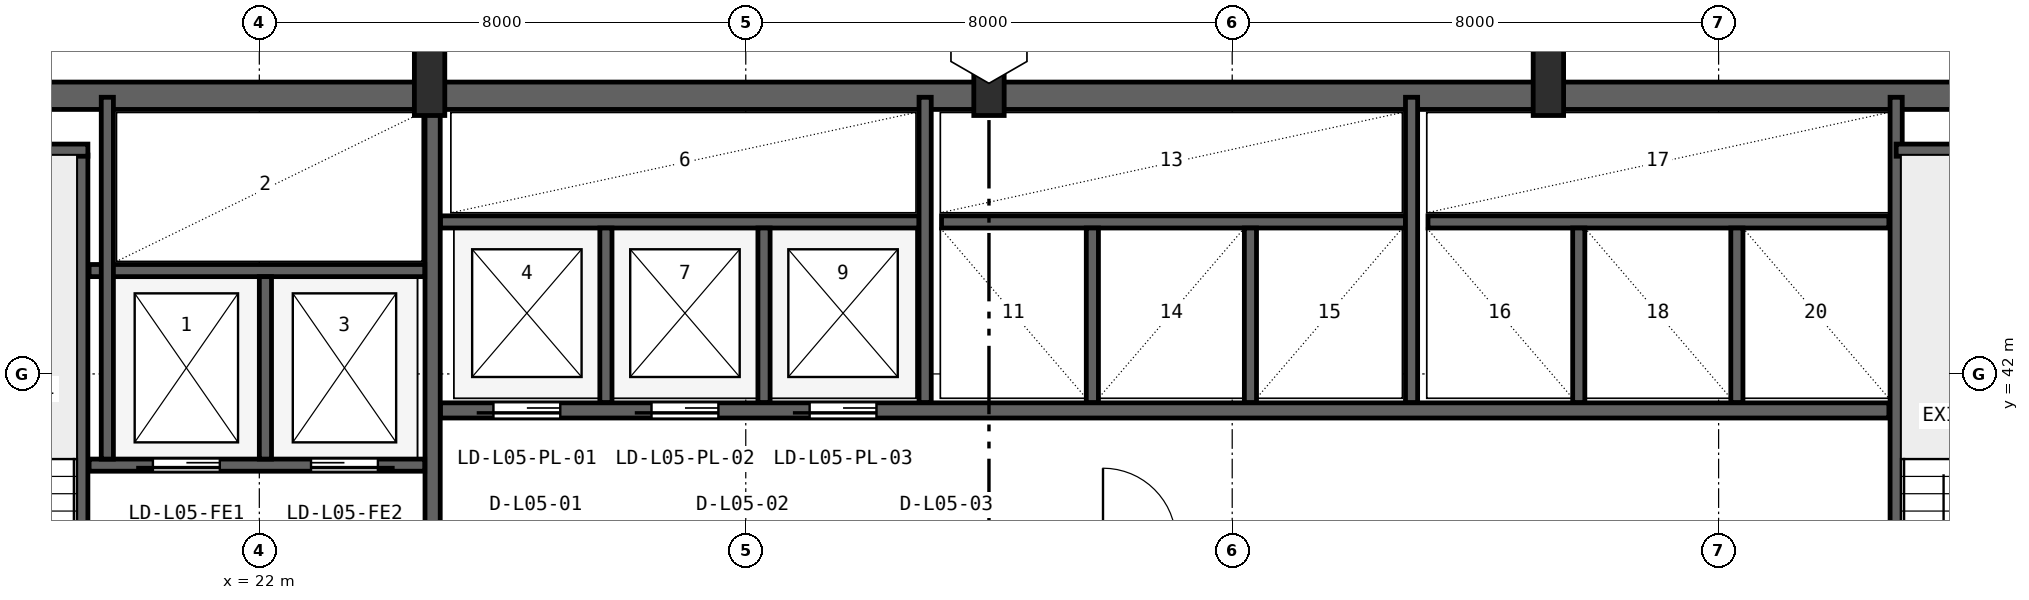
"""IFC4 building model, lengths in metres.
Left out: names, types, materials, properties, quantities, classifications, styles, units other than length and angle.
Written with IfcOpenShell. Run it as: python <this file> out.ifc"""

import sys

from ifc_helpers import new_model, si_unit, direction, frame, frame_2d, origin, origin_2d, place, context, subcontext, project, spatial, rectangle, i_section, extrude, source, transform, mapped, element, fill, save


model = new_model("IFC4")
c1 = context("Model", 3, precision=1e-05, world=origin(), true_north=direction((0.0, 1.0)))
c2 = subcontext(c1, "Body", "Model", "MODEL_VIEW")
j1 = project(units=[si_unit("LENGTHUNIT", "METRE"), si_unit("PLANEANGLEUNIT", "RADIAN")], contexts=[c1])
p1 = place(None, origin())
s1 = spatial("IfcSite", under=j1, at=p1, CompositionType="ELEMENT")
p2 = place(p1, origin())
s2 = spatial("IfcBuilding", under=s1, at=p2, CompositionType="ELEMENT")
p3 = place(p2, frame((0.0, 0.0, 27.6)))
s3 = spatial("IfcBuildingStorey", under=s2, at=p3, CompositionType="ELEMENT", Elevation=27.6)
p4 = place(p3, frame((15.6, 46.575, 0.0), z_axis=(0.0, 0.0, 1.0), x_axis=(1.0, 0.0, 0.0)))
e1 = element("IfcWall", 1, at=p4, inside=s3, PredefinedType="SHEAR", context=c2, shape_type="SweptSolid", body=[
    extrude(rectangle(XDim=36.8, YDim=0.45, at=frame_2d((18.4, 0.0))), origin(), (0.0, 0.0, 1.0), 3.65),
])
m1 = source(origin(), c2, "Body", "SweptSolid", [
    extrude(i_section(OverallWidth=0.5, OverallDepth=1.1, WebThickness=0.018, FlangeThickness=0.032, FilletRadius=0.018, at=origin_2d()), origin(), (0.0, 0.0, 1.0), 3.9),
])
for number, where, z_axis, x_axis in (
    (2, (24.8, 46.8, 0.0), (0.0, 0.0, 1.0), (1.0, 0.0, 0.0)),
    (3, (34.0, 46.8, 0.0), (0.0, 0.0, 1.0), (1.0, 0.0, 0.0)),
    (4, (43.2, 46.8, 0.0), (0.0, 0.0, 1.0), (1.0, 0.0, 0.0)),
):
    element("IfcColumn", number, at=place(p3, frame(where, z_axis=z_axis, x_axis=x_axis)), inside=s3, PredefinedType="COLUMN", context=c2, shape_type="MappedRepresentation", body=[
        mapped(m1, transform((0.0, 0.0, 0.0), x_axis=(1.0, 0.0, 0.0), y_axis=(0.0, 1.0, 0.0), z_axis=(0.0, 0.0, 1.0), scale=1.0)),
    ])
p5 = place(p3, frame((19.08, 35.95, 0.0), z_axis=(0.0, 0.0, 1.0), x_axis=(0.0, 1.0, 0.0)))
e5 = element("IfcWall", 5, at=p5, inside=s3, PredefinedType="SHEAR", context=c2, shape_type="SweptSolid", body=[
    extrude(rectangle(XDim=9.65, YDim=0.2, at=frame_2d((4.825, 0.0))), origin(), (0.0, 0.0, 1.0), 3.65),
])
p6 = place(p5, frame((0.25, 0.0, 0.0)))
e6 = element("IfcOpeningElement", 6, at=p6, cuts=e5, PredefinedType="OPENING", context=c2, shape_type="SweptSolid", body=[
    extrude(rectangle(XDim=0.95, YDim=2.1, at=frame_2d((0.475, 1.05))), frame((0.0, 0.11, 0.0), z_axis=(0.0, -1.0, 0.0), x_axis=(1.0, 0.0, 0.0)), (0.0, 0.0, 1.0), 0.22),
])
p7 = place(p3, frame((15.95, 45.68, 0.0), z_axis=(0.0, 0.0, 1.0), x_axis=(1.0, 0.0, 0.0)))
e7 = element("IfcWall", 7, at=p7, inside=s3, PredefinedType="SHEAR", context=c2, shape_type="SweptSolid", body=[
    extrude(rectangle(XDim=3.23, YDim=0.2, at=frame_2d((1.615, 0.0))), origin(), (0.0, 0.0, 1.0), 3.65),
])
p8 = place(p3, frame((24.85, 36.05, 0.0), z_axis=(0.0, 0.0, 1.0), x_axis=(0.0, 1.0, 0.0)))
e8 = element("IfcWall", 8, at=p8, inside=s3, PredefinedType="SHEAR", context=c2, shape_type="SweptSolid", body=[
    extrude(rectangle(XDim=10.45, YDim=0.25, at=frame_2d((5.225, 0.0))), origin(), (0.0, 0.0, 1.0), 3.65),
])
p9 = place(p3, frame((19.2, 40.5, 0.0), z_axis=(0.0, 0.0, 1.0), x_axis=(1.0, 0.0, 0.0)))
e9 = element("IfcWall", 9, at=p9, inside=s3, PredefinedType="SHEAR", context=c2, shape_type="SweptSolid", body=[
    extrude(rectangle(XDim=5.52, YDim=0.2, at=frame_2d((2.76, 0.0))), origin(), (0.0, 0.0, 1.0), 3.65),
])
p10 = place(p9, frame((1.05, 0.0, 0.0)))
e10 = element("IfcOpeningElement", 10, at=p10, cuts=e9, PredefinedType="OPENING", context=c2, shape_type="SweptSolid", body=[
    extrude(rectangle(XDim=1.1, YDim=2.18, at=frame_2d((0.55, 1.09))), frame((0.0, 0.11, 0.0), z_axis=(0.0, -1.0, 0.0), x_axis=(1.0, 0.0, 0.0)), (0.0, 0.0, 1.0), 0.22),
])
p11 = place(p9, frame((3.65, 0.0, 0.0)))
e11 = element("IfcOpeningElement", 11, at=p11, cuts=e9, PredefinedType="OPENING", context=c2, shape_type="SweptSolid", body=[
    extrude(rectangle(XDim=1.1, YDim=2.18, at=frame_2d((0.55, 1.09))), frame((0.0, 0.11, 0.0), z_axis=(0.0, -1.0, 0.0), x_axis=(1.0, 0.0, 0.0)), (0.0, 0.0, 1.0), 0.22),
])
p12 = place(p3, frame((19.2, 43.7, 0.0), z_axis=(0.0, 0.0, 1.0), x_axis=(1.0, 0.0, 0.0)))
e12 = element("IfcWall", 12, at=p12, inside=s3, PredefinedType="SHEAR", context=c2, shape_type="SweptSolid", body=[
    extrude(rectangle(XDim=5.52, YDim=0.2, at=frame_2d((2.76, 0.0))), origin(), (0.0, 0.0, 1.0), 3.65),
])
p13 = place(p3, frame((22.1, 40.6, 0.0), z_axis=(0.0, 0.0, 1.0), x_axis=(0.0, 1.0, 0.0)))
e13 = element("IfcWall", 13, at=p13, inside=s3, PredefinedType="SHEAR", context=c2, shape_type="SweptSolid", body=[
    extrude(rectangle(XDim=3.0, YDim=0.2, at=frame_2d((1.5, 0.0))), origin(), (0.0, 0.0, 1.0), 3.65),
])
p14 = place(p3, frame((19.5, 40.6, 0.0), z_axis=(0.0, 0.0, 1.0), x_axis=(0.0, 1.0, 0.0)))
e14 = element("IfcWall", 14, at=p14, inside=s3, PredefinedType="SHEAR", context=c2, shape_type="SweptSolid", body=[
    extrude(rectangle(XDim=5.95, YDim=0.2, at=frame_2d((2.975, 0.0))), origin(), (0.0, 0.0, 1.0), 3.65),
])
p15 = place(p3, frame((48.92, 36.05, 0.0), z_axis=(0.0, 0.0, 1.0), x_axis=(0.0, 1.0, 0.0)))
e15 = element("IfcWall", 15, at=p15, inside=s3, PredefinedType="SHEAR", context=c2, shape_type="SweptSolid", body=[
    extrude(rectangle(XDim=10.5, YDim=0.2, at=frame_2d((5.25, 0.0))), origin(), (0.0, 0.0, 1.0), 3.65),
])
p16 = place(p3, frame((48.92, 45.68, 0.0), z_axis=(0.0, 0.0, 1.0), x_axis=(1.0, 0.0, 0.0)))
e16 = element("IfcWall", 16, at=p16, inside=s3, PredefinedType="SHEAR", context=c2, shape_type="SweptSolid", body=[
    extrude(rectangle(XDim=3.18, YDim=0.2, at=frame_2d((1.59, 0.0))), origin(), (0.0, 0.0, 1.0), 3.65),
])
p17 = place(p3, frame((24.98, 41.4, 0.0), z_axis=(0.0, 0.0, 1.0), x_axis=(1.0, 0.0, 0.0)))
e17 = element("IfcWall", 17, at=p17, inside=s3, PredefinedType="SHEAR", context=c2, shape_type="SweptSolid", body=[
    extrude(rectangle(XDim=23.82, YDim=0.25, at=frame_2d((11.91, 0.0))), origin(), (0.0, 0.0, 1.0), 3.65),
])
p18 = place(p17, frame((0.87, 0.0, 0.0)))
e18 = element("IfcOpeningElement", 18, at=p18, cuts=e17, PredefinedType="OPENING", context=c2, shape_type="SweptSolid", body=[
    extrude(rectangle(XDim=1.1, YDim=2.18, at=frame_2d((0.55, 1.09))), frame((0.0, 0.135, 0.0), z_axis=(0.0, -1.0, 0.0), x_axis=(1.0, 0.0, 0.0)), (0.0, 0.0, 1.0), 0.27),
])
p19 = place(p17, frame((3.47, 0.0, 0.0)))
e19 = element("IfcOpeningElement", 19, at=p19, cuts=e17, PredefinedType="OPENING", context=c2, shape_type="SweptSolid", body=[
    extrude(rectangle(XDim=1.1, YDim=2.18, at=frame_2d((0.55, 1.09))), frame((0.0, 0.135, 0.0), z_axis=(0.0, -1.0, 0.0), x_axis=(1.0, 0.0, 0.0)), (0.0, 0.0, 1.0), 0.27),
])
p20 = place(p17, frame((6.07, 0.0, 0.0)))
e20 = element("IfcOpeningElement", 20, at=p20, cuts=e17, PredefinedType="OPENING", context=c2, shape_type="SweptSolid", body=[
    extrude(rectangle(XDim=1.1, YDim=2.18, at=frame_2d((0.55, 1.09))), frame((0.0, 0.135, 0.0), z_axis=(0.0, -1.0, 0.0), x_axis=(1.0, 0.0, 0.0)), (0.0, 0.0, 1.0), 0.27),
])
p21 = place(p3, frame((24.98, 44.5, 0.0), z_axis=(0.0, 0.0, 1.0), x_axis=(1.0, 0.0, 0.0)))
e21 = element("IfcWall", 21, at=p21, inside=s3, PredefinedType="SHEAR", context=c2, shape_type="SweptSolid", body=[
    extrude(rectangle(XDim=7.87, YDim=0.2, at=frame_2d((3.935, 0.0))), origin(), (0.0, 0.0, 1.0), 3.65),
])
for number, where, z_axis, x_axis in (
    (22, (27.7, 41.53, 0.0), (0.0, 0.0, 1.0), (0.0, 1.0, 0.0)),
    (23, (30.3, 41.53, 0.0), (0.0, 0.0, 1.0), (0.0, 1.0, 0.0)),
):
    element("IfcWall", number, at=place(p3, frame(where, z_axis=z_axis, x_axis=x_axis)), inside=s3, PredefinedType="SHEAR", context=c2, shape_type="SweptSolid", body=[
        extrude(rectangle(XDim=2.87, YDim=0.2, at=frame_2d((1.435, 0.0))), origin(), (0.0, 0.0, 1.0), 3.65),
    ])
p22 = place(p3, frame((32.95, 41.53, 0.0), z_axis=(0.0, 0.0, 1.0), x_axis=(0.0, 1.0, 0.0)))
e24 = element("IfcWall", 24, at=p22, inside=s3, PredefinedType="SHEAR", context=c2, shape_type="SweptSolid", body=[
    extrude(rectangle(XDim=5.02, YDim=0.2, at=frame_2d((2.51, 0.0))), origin(), (0.0, 0.0, 1.0), 3.65),
])
p23 = place(p3, frame((33.22, 44.5, 0.0), z_axis=(0.0, 0.0, 1.0), x_axis=(1.0, 0.0, 0.0)))
e25 = element("IfcWall", 25, at=p23, inside=s3, PredefinedType="SHEAR", context=c2, shape_type="SweptSolid", body=[
    extrude(rectangle(XDim=7.63, YDim=0.2, at=frame_2d((3.815, 0.0))), origin(), (0.0, 0.0, 1.0), 3.65),
])
for number, where, z_axis, x_axis in (
    (26, (35.7, 41.53, 0.0), (0.0, 0.0, 1.0), (0.0, 1.0, 0.0)),
    (27, (38.3, 41.53, 0.0), (0.0, 0.0, 1.0), (0.0, 1.0, 0.0)),
):
    element("IfcWall", number, at=place(p3, frame(where, z_axis=z_axis, x_axis=x_axis)), inside=s3, PredefinedType="SHEAR", context=c2, shape_type="SweptSolid", body=[
        extrude(rectangle(XDim=2.87, YDim=0.2, at=frame_2d((1.435, 0.0))), origin(), (0.0, 0.0, 1.0), 3.65),
    ])
p24 = place(p3, frame((40.95, 41.53, 0.0), z_axis=(0.0, 0.0, 1.0), x_axis=(0.0, 1.0, 0.0)))
e28 = element("IfcWall", 28, at=p24, inside=s3, PredefinedType="SHEAR", context=c2, shape_type="SweptSolid", body=[
    extrude(rectangle(XDim=5.02, YDim=0.2, at=frame_2d((2.51, 0.0))), origin(), (0.0, 0.0, 1.0), 3.65),
])
p25 = place(p3, frame((41.22, 44.5, 0.0), z_axis=(0.0, 0.0, 1.0), x_axis=(1.0, 0.0, 0.0)))
e29 = element("IfcWall", 29, at=p25, inside=s3, PredefinedType="SHEAR", context=c2, shape_type="SweptSolid", body=[
    extrude(rectangle(XDim=7.58, YDim=0.2, at=frame_2d((3.79, 0.0))), origin(), (0.0, 0.0, 1.0), 3.65),
])
for number, where, z_axis, x_axis in (
    (30, (43.7, 41.53, 0.0), (0.0, 0.0, 1.0), (0.0, 1.0, 0.0)),
    (31, (46.3, 41.53, 0.0), (0.0, 0.0, 1.0), (0.0, 1.0, 0.0)),
):
    element("IfcWall", number, at=place(p3, frame(where, z_axis=z_axis, x_axis=x_axis)), inside=s3, PredefinedType="SHEAR", context=c2, shape_type="SweptSolid", body=[
        extrude(rectangle(XDim=2.87, YDim=0.2, at=frame_2d((1.435, 0.0))), origin(), (0.0, 0.0, 1.0), 3.65),
    ])
m2 = source(origin(), c2, "Body", "SweptSolid", [
    extrude(rectangle(XDim=1.1, YDim=2.18, at=frame_2d((0.55, 1.09))), frame((0.0, 0.025, 0.0), z_axis=(0.0, -1.0, 0.0), x_axis=(1.0, 0.0, 0.0)), (0.0, 0.0, 1.0), 0.05),
])
p26 = place(p10, frame((1.1, 0.0, 0.0), z_axis=(0.0, 0.0, 1.0), x_axis=(-1.0, 0.0, 0.0)))
e32 = element("IfcDoor", 32, at=p26, inside=s3, OperationType="SLIDING_TO_LEFT", PredefinedType="DOOR", context=c2, shape_type="MappedRepresentation", body=[
    mapped(m2, transform((0.0, 0.0, 0.0), x_axis=(1.0, 0.0, 0.0), y_axis=(0.0, 1.0, 0.0), z_axis=(0.0, 0.0, 1.0), scale=1.0)),
])
fill(e10, e32)
p27 = place(p11, frame((1.1, 0.0, 0.0), z_axis=(0.0, 0.0, 1.0), x_axis=(-1.0, 0.0, 0.0)))
e33 = element("IfcDoor", 33, at=p27, inside=s3, OperationType="SLIDING_TO_RIGHT", PredefinedType="DOOR", context=c2, shape_type="MappedRepresentation", body=[
    mapped(m2, transform((0.0, 0.0, 0.0), x_axis=(1.0, 0.0, 0.0), y_axis=(0.0, 1.0, 0.0), z_axis=(0.0, 0.0, 1.0), scale=1.0)),
])
fill(e11, e33)
p28 = place(p18, frame((1.1, 0.0, 0.0), z_axis=(0.0, 0.0, 1.0), x_axis=(-1.0, 0.0, 0.0)))
e34 = element("IfcDoor", 34, at=p28, inside=s3, OperationType="SLIDING_TO_LEFT", PredefinedType="DOOR", context=c2, shape_type="MappedRepresentation", body=[
    mapped(m2, transform((0.0, 0.0, 0.0), x_axis=(1.0, 0.0, 0.0), y_axis=(0.0, 1.0, 0.0), z_axis=(0.0, 0.0, 1.0), scale=1.0)),
])
fill(e18, e34)
p29 = place(p19, frame((1.1, 0.0, 0.0), z_axis=(0.0, 0.0, 1.0), x_axis=(-1.0, 0.0, 0.0)))
e35 = element("IfcDoor", 35, at=p29, inside=s3, OperationType="SLIDING_TO_LEFT", PredefinedType="DOOR", context=c2, shape_type="MappedRepresentation", body=[
    mapped(m2, transform((0.0, 0.0, 0.0), x_axis=(1.0, 0.0, 0.0), y_axis=(0.0, 1.0, 0.0), z_axis=(0.0, 0.0, 1.0), scale=1.0)),
])
fill(e19, e35)
p30 = place(p20, frame((1.1, 0.0, 0.0), z_axis=(0.0, 0.0, 1.0), x_axis=(-1.0, 0.0, 0.0)))
e36 = element("IfcDoor", 36, at=p30, inside=s3, OperationType="SLIDING_TO_LEFT", PredefinedType="DOOR", context=c2, shape_type="MappedRepresentation", body=[
    mapped(m2, transform((0.0, 0.0, 0.0), x_axis=(1.0, 0.0, 0.0), y_axis=(0.0, 1.0, 0.0), z_axis=(0.0, 0.0, 1.0), scale=1.0)),
])
fill(e20, e36)
save(model, sys.argv[1])
